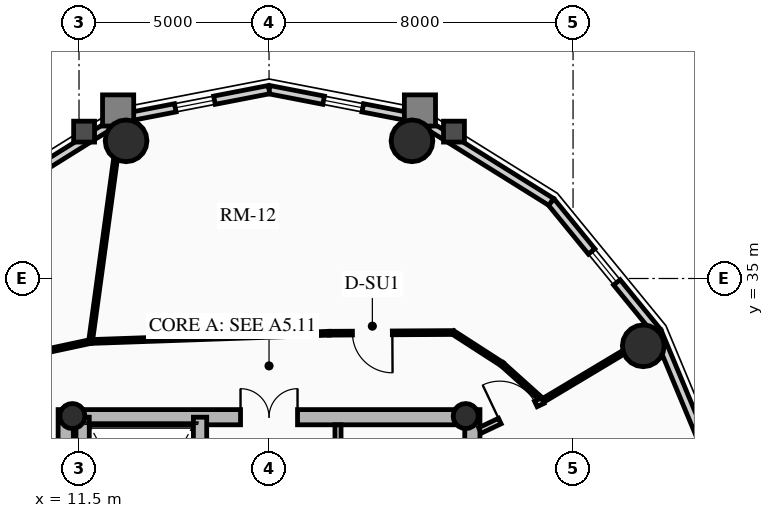
"""IFC4 building model, lengths in metres.
Left out: names, types, materials, properties, quantities, classifications, styles, units other than length and angle.
Written with IfcOpenShell. Run it as: python <this file> out.ifc"""

import sys

from ifc_helpers import new_model, si_unit, direction, frame, frame_2d, origin, origin_2d, place, context, subcontext, project, spatial, rectangle, circle, hollow_circle, extrude, source, transform, mapped, element, fill, save


model = new_model("IFC4")
c1 = context("Model", 3, precision=1e-05, world=origin(), true_north=direction((0.0, 1.0)))
c2 = subcontext(c1, "Body", "Model", "MODEL_VIEW")
j1 = project(units=[si_unit("LENGTHUNIT", "METRE"), si_unit("PLANEANGLEUNIT", "RADIAN")], contexts=[c1])
p1 = place(None, origin())
s1 = spatial("IfcSite", under=j1, at=p1, CompositionType="ELEMENT")
p2 = place(p1, origin())
s2 = spatial("IfcBuilding", under=s1, at=p2, CompositionType="ELEMENT")
p3 = place(p2, frame((0.0, 0.0, 202.48)))
s3 = spatial("IfcBuildingStorey", under=s2, at=p3, CompositionType="ELEMENT", Elevation=202.48)
for number, where, z_axis, x_axis in (
    (1, (11.15, 17.45, 0.0), (0.0, 0.0, 1.0), (0.0, 1.0, 0.0)),
    (2, (21.85, 17.45, 0.0), (0.0, 0.0, 1.0), (0.0, 1.0, 0.0)),
):
    element("IfcWall", number, at=place(p3, frame(where, z_axis=z_axis, x_axis=x_axis)), inside=s3, PredefinedType="SHEAR", context=c2, shape_type="SweptSolid", body=[
        extrude(rectangle(XDim=14.1, YDim=0.4, at=frame_2d((7.05, 0.0))), origin(), (0.0, 0.0, 1.0), 2.91),
    ])
p4 = place(p3, frame((11.15, 31.35, 0.0), z_axis=(0.0, 0.0, 1.0), x_axis=(1.0, 0.0, 0.0)))
e3 = element("IfcWall", 3, at=p4, inside=s3, PredefinedType="SHEAR", context=c2, shape_type="SweptSolid", body=[
    extrude(rectangle(XDim=10.7, YDim=0.4, at=frame_2d((5.35, 0.0))), origin(), (0.0, 0.0, 1.0), 2.91),
])
m1 = source(origin(), c2, "Body", "SweptSolid", [
    extrude(rectangle(XDim=1.5, YDim=2.02, at=frame_2d((0.75, 1.01))), frame((0.0, 0.21, 0.0), z_axis=(0.0, -1.0, 0.0), x_axis=(1.0, 0.0, 0.0)), (0.0, 0.0, 1.0), 0.42),
])
p5 = place(p4, frame((4.6, 0.0, 0.0)))
e4 = element("IfcOpeningElement", 4, at=p5, cuts=e3, PredefinedType="OPENING", context=c2, shape_type="MappedRepresentation", body=[
    mapped(m1, transform((0.0, 0.0, 0.0), x_axis=(1.0, 0.0, 0.0), y_axis=(0.0, 1.0, 0.0), z_axis=(0.0, 0.0, 1.0), scale=1.0)),
])
p6 = place(p3, frame((14.685, 17.65, 0.0), z_axis=(0.0, 0.0, 1.0), x_axis=(0.0, 1.0, 0.0)))
e5 = element("IfcWall", 5, at=p6, inside=s3, PredefinedType="SHEAR", context=c2, shape_type="SweptSolid", body=[
    extrude(rectangle(XDim=13.7, YDim=0.35, at=frame_2d((6.85, 0.0))), origin(), (0.0, 0.0, 1.0), 2.91),
])
m2 = source(origin(), c2, "Body", "SweptSolid", [
    extrude(rectangle(XDim=1.1, YDim=2.015, at=frame_2d((0.55, 1.007))), frame((0.0, 0.185, 0.0), z_axis=(0.0, -1.0, 0.0), x_axis=(1.0, 0.0, 0.0)), (0.0, 0.0, 1.0), 0.37),
])
p7 = place(p6, frame((4.85, 0.0, 0.0)))
e6 = element("IfcOpeningElement", 6, at=p7, cuts=e5, PredefinedType="OPENING", context=c2, shape_type="MappedRepresentation", body=[
    mapped(m2, transform((0.0, 0.0, 0.0), x_axis=(1.0, 0.0, 0.0), y_axis=(0.0, 1.0, 0.0), z_axis=(0.0, 0.0, 1.0), scale=1.0)),
])
p8 = place(p6, frame((0.625, 0.0, 0.0)))
e7 = element("IfcOpeningElement", 7, at=p8, cuts=e5, PredefinedType="OPENING", context=c2, shape_type="MappedRepresentation", body=[
    mapped(m2, transform((0.0, 0.0, 0.0), x_axis=(1.0, 0.0, 0.0), y_axis=(0.0, 1.0, 0.0), z_axis=(0.0, 0.0, 1.0), scale=1.0)),
])
p9 = place(p6, frame((2.625, 0.0, 0.0)))
e8 = element("IfcOpeningElement", 8, at=p9, cuts=e5, PredefinedType="OPENING", context=c2, shape_type="MappedRepresentation", body=[
    mapped(m2, transform((0.0, 0.0, 0.0), x_axis=(1.0, 0.0, 0.0), y_axis=(0.0, 1.0, 0.0), z_axis=(0.0, 0.0, 1.0), scale=1.0)),
])
m3 = source(origin(), c2, "Body", "SweptSolid", [
    extrude(rectangle(XDim=1.15, YDim=2.02, at=frame_2d((0.575, 1.01))), frame((0.0, 0.185, 0.0), z_axis=(0.0, -1.0, 0.0), x_axis=(1.0, 0.0, 0.0)), (0.0, 0.0, 1.0), 0.37),
])
p10 = place(p6, frame((7.27, 0.0, 0.0)))
e9 = element("IfcOpeningElement", 9, at=p10, cuts=e5, PredefinedType="OPENING", context=c2, shape_type="MappedRepresentation", body=[
    mapped(m3, transform((0.0, 0.0, 0.0), x_axis=(1.0, 0.0, 0.0), y_axis=(0.0, 1.0, 0.0), z_axis=(0.0, 0.0, 1.0), scale=1.0)),
])
p11 = place(p3, frame((11.595, 24.655, 0.0), z_axis=(0.0, 0.0, 1.0), x_axis=(0.0, 1.0, 0.0)))
e10 = element("IfcWall", 10, at=p11, inside=s3, PredefinedType="SHEAR", context=c2, shape_type="SweptSolid", body=[
    extrude(rectangle(XDim=6.695, YDim=0.35, at=frame_2d((3.348, 0.0))), origin(), (0.0, 0.0, 1.0), 2.91),
])
for number, where, z_axis, x_axis in (
    (11, (11.325, 31.38, 0.0), (0.0, 0.0, 1.0), (1.0, 0.0, 0.0)),
    (12, (21.675, 31.38, 0.0), (0.0, 0.0, 1.0), (1.0, 0.0, 0.0)),
):
    element("IfcColumn", number, at=place(p3, frame(where, z_axis=z_axis, x_axis=x_axis)), inside=s3, PredefinedType="COLUMN", context=c2, shape_type="SweptSolid", body=[
        extrude(hollow_circle(Radius=0.33, WallThickness=0.025, at=origin_2d()), origin(), (0.0, 0.0, 1.0), 2.91),
    ])
for number, where, z_axis, x_axis in (
    (13, (26.347, 33.229, 0.0), (0.0, 0.0, 1.0), (1.0, 0.0, 0.0)),
    (14, (20.261, 38.623, 0.0), (0.0, 0.0, 1.0), (1.0, 0.0, 0.0)),
    (15, (12.739, 38.623, 0.0), (0.0, 0.0, 1.0), (1.0, 0.0, 0.0)),
):
    element("IfcColumn", number, at=place(p3, frame(where, z_axis=z_axis, x_axis=x_axis)), inside=s3, PredefinedType="USERDEFINED", context=c2, shape_type="SweptSolid", body=[
        extrude(circle(Radius=0.55, at=origin_2d()), origin(), (0.0, 0.0, 1.0), 2.91),
    ])
p12 = place(p3, frame((26.718, 33.593, 0.0), z_axis=(0.0, 0.0, 1.0), x_axis=(0.384036305194, -0.923317993052, 0.0)))
e16 = element("IfcWall", 16, at=p12, inside=s3, PredefinedType="SOLIDWALL", context=c2, shape_type="SweptSolid", body=[
    extrude(rectangle(XDim=4.671, YDim=0.22, at=frame_2d((2.335, 0.0))), origin(), (0.0, 0.0, 1.0), 2.322),
])
p13 = place(p3, frame((23.924, 37.015, 0.0), z_axis=(0.0, 0.0, 1.0), x_axis=(0.632467166636, -0.774587169483, 0.0)))
e17 = element("IfcWall", 17, at=p13, inside=s3, PredefinedType="SOLIDWALL", context=c2, shape_type="SweptSolid", body=[
    extrude(rectangle(XDim=4.418, YDim=0.22, at=frame_2d((2.209, 0.0))), origin(), (0.0, 0.0, 1.0), 2.322),
])
m4 = source(origin(), c2, "Body", "SweptSolid", [
    extrude(rectangle(XDim=1.05, YDim=1.3, at=frame_2d((0.525, 0.65))), frame((0.0, 0.12, 0.0), z_axis=(0.0, -1.0, 0.0), x_axis=(1.0, 0.0, 0.0)), (0.0, 0.0, 1.0), 0.24),
])
p14 = place(p13, frame((1.684, 0.0, 0.65)))
e18 = element("IfcOpeningElement", 18, at=p14, cuts=e17, PredefinedType="OPENING", context=c2, shape_type="MappedRepresentation", body=[
    mapped(m4, transform((0.0, 0.0, 0.0), x_axis=(1.0, 0.0, 0.0), y_axis=(0.0, 1.0, 0.0), z_axis=(0.0, 0.0, 1.0), scale=1.0)),
])
p15 = place(p3, frame((20.403, 39.213, 0.0), z_axis=(0.0, 0.0, 1.0), x_axis=(0.848318713376, -0.529485939886, 0.0)))
e19 = element("IfcWall", 19, at=p15, inside=s3, PredefinedType="SOLIDWALL", context=c2, shape_type="SweptSolid", body=[
    extrude(rectangle(XDim=4.15, YDim=0.22, at=frame_2d((2.075, 0.0))), origin(), (0.0, 0.0, 1.0), 2.322),
])
p16 = place(p3, frame((16.5, 39.97, 0.0), z_axis=(0.0, 0.0, 1.0), x_axis=(0.981700307484, -0.190432419211, 0.0)))
e20 = element("IfcWall", 20, at=p16, inside=s3, PredefinedType="SOLIDWALL", context=c2, shape_type="SweptSolid", body=[
    extrude(rectangle(XDim=3.976, YDim=0.22, at=frame_2d((1.988, 0.0))), origin(), (0.0, 0.0, 1.0), 2.322),
])
p17 = place(p16, frame((1.463, 0.0, 0.65)))
e21 = element("IfcOpeningElement", 21, at=p17, cuts=e20, PredefinedType="OPENING", context=c2, shape_type="MappedRepresentation", body=[
    mapped(m4, transform((0.0, 0.0, 0.0), x_axis=(1.0, 0.0, 0.0), y_axis=(0.0, 1.0, 0.0), z_axis=(0.0, 0.0, 1.0), scale=1.0)),
])
p18 = place(p3, frame((12.597, 39.213, 0.0), z_axis=(0.0, 0.0, 1.0), x_axis=(0.981700307484, 0.190432419211, 0.0)))
e22 = element("IfcWall", 22, at=p18, inside=s3, PredefinedType="SOLIDWALL", context=c2, shape_type="SweptSolid", body=[
    extrude(rectangle(XDim=3.976, YDim=0.22, at=frame_2d((1.988, 0.0))), origin(), (0.0, 0.0, 1.0), 2.322),
])
p19 = place(p18, frame((1.463, 0.0, 0.65)))
e23 = element("IfcOpeningElement", 23, at=p19, cuts=e22, PredefinedType="OPENING", context=c2, shape_type="MappedRepresentation", body=[
    mapped(m4, transform((0.0, 0.0, 0.0), x_axis=(1.0, 0.0, 0.0), y_axis=(0.0, 1.0, 0.0), z_axis=(0.0, 0.0, 1.0), scale=1.0)),
])
p20 = place(p3, frame((9.076, 37.015, 0.0), z_axis=(0.0, 0.0, 1.0), x_axis=(0.848318713376, 0.529485939886, 0.0)))
e24 = element("IfcWall", 24, at=p20, inside=s3, PredefinedType="SOLIDWALL", context=c2, shape_type="SweptSolid", body=[
    extrude(rectangle(XDim=4.15, YDim=0.22, at=frame_2d((2.075, 0.0))), origin(), (0.0, 0.0, 1.0), 2.322),
])
p21 = place(p3, frame((18.315, 27.25, 0.0), z_axis=(0.0, 0.0, 1.0), x_axis=(0.0, 1.0, 0.0)))
e25 = element("IfcWall", 25, at=p21, inside=s3, PredefinedType="PARTITIONING", context=c2, shape_type="SweptSolid", body=[
    extrude(rectangle(XDim=3.9, YDim=0.16, at=frame_2d((1.95, 0.0))), origin(), (0.0, 0.0, 1.0), 2.685),
])
m5 = source(origin(), c2, "Body", "SweptSolid", [
    extrude(rectangle(XDim=0.9, YDim=2.005, at=frame_2d((0.45, 1.002))), frame((0.0, 0.09, 0.0), z_axis=(0.0, -1.0, 0.0), x_axis=(1.0, 0.0, 0.0)), (0.0, 0.0, 1.0), 0.18),
])
p22 = place(p21, frame((0.55, 0.0, 0.0)))
e26 = element("IfcOpeningElement", 26, at=p22, cuts=e25, PredefinedType="OPENING", context=c2, shape_type="MappedRepresentation", body=[
    mapped(m5, transform((0.0, 0.0, 0.0), x_axis=(1.0, 0.0, 0.0), y_axis=(0.0, 1.0, 0.0), z_axis=(0.0, 0.0, 1.0), scale=1.0)),
])
p23 = place(p21, frame((2.35, 0.0, 0.0)))
e27 = element("IfcOpeningElement", 27, at=p23, cuts=e25, PredefinedType="OPENING", context=c2, shape_type="MappedRepresentation", body=[
    mapped(m5, transform((0.0, 0.0, 0.0), x_axis=(1.0, 0.0, 0.0), y_axis=(0.0, 1.0, 0.0), z_axis=(0.0, 0.0, 1.0), scale=1.0)),
])
p24 = place(p3, frame((23.701, 31.786, 0.0), z_axis=(0.0, 0.0, 1.0), x_axis=(-0.743742806382, 0.668465883913, 0.0)))
e28 = element("IfcWall", 28, at=p24, inside=s3, PredefinedType="MOVABLE", context=c2, shape_type="SweptSolid", body=[
    extrude(rectangle(XDim=1.434, YDim=0.1, at=frame_2d((0.717, 0.0))), origin(), (0.0, 0.0, 1.0), 2.322),
])
p25 = place(p3, frame((22.635, 32.744, 0.0), z_axis=(0.0, 0.0, 1.0), x_axis=(-0.840119270642, 0.542401706391, 0.0)))
e29 = element("IfcWall", 29, at=p25, inside=s3, PredefinedType="MOVABLE", context=c2, shape_type="SweptSolid", body=[
    extrude(rectangle(XDim=1.538, YDim=0.1, at=frame_2d((0.769, 0.0))), origin(), (0.0, 0.0, 1.0), 2.255),
])
p26 = place(p3, frame((21.344, 33.578, 0.0), z_axis=(0.0, 0.0, 1.0), x_axis=(-0.999984243152, -0.005613684, 0.0)))
e30 = element("IfcWall", 30, at=p26, inside=s3, PredefinedType="MOVABLE", context=c2, shape_type="SweptSolid", body=[
    extrude(rectangle(XDim=3.262, YDim=0.1, at=frame_2d((1.631, 0.0))), origin(), (0.0, 0.0, 1.0), 2.322),
])
m6 = source(origin(), c2, "Body", "SweptSolid", [
    extrude(rectangle(XDim=1.05, YDim=2.015, at=frame_2d((0.525, 1.007))), frame((0.0, 0.06, 0.0), z_axis=(0.0, -1.0, 0.0), x_axis=(1.0, 0.0, 0.0)), (0.0, 0.0, 1.0), 0.12),
])
p27 = place(p26, frame((1.599, 0.0, 0.0)))
e31 = element("IfcOpeningElement", 31, at=p27, cuts=e30, PredefinedType="OPENING", context=c2, shape_type="MappedRepresentation", body=[
    mapped(m6, transform((0.0, 0.0, 0.0), x_axis=(1.0, 0.0, 0.0), y_axis=(0.0, 1.0, 0.0), z_axis=(0.0, 0.0, 1.0), scale=1.0)),
])
p28 = place(p3, frame((18.082, 33.56, 0.0), z_axis=(0.0, 0.0, 1.0), x_axis=(-0.999399009709, -0.034664382185, 0.0)))
e32 = element("IfcWall", 32, at=p28, inside=s3, PredefinedType="MOVABLE", context=c2, shape_type="SweptSolid", body=[
    extrude(rectangle(XDim=6.282, YDim=0.1, at=frame_2d((3.141, 0.0))), origin(), (0.0, 0.0, 1.0), 2.255),
])
p29 = place(p3, frame((11.803, 33.342, 0.0), z_axis=(0.0, 0.0, 1.0), x_axis=(-0.977750742783, -0.209770076483, 0.0)))
e33 = element("IfcWall", 33, at=p29, inside=s3, PredefinedType="MOVABLE", context=c2, shape_type="SweptSolid", body=[
    extrude(rectangle(XDim=1.868, YDim=0.1, at=frame_2d((0.934, 0.0))), origin(), (0.0, 0.0, 1.0), 2.255),
])
p30 = place(p3, frame((23.701, 31.786, 0.0), z_axis=(0.0, 0.0, 1.0), x_axis=(0.858059206709, 0.513550774298, 0.0)))
e34 = element("IfcWall", 34, at=p30, inside=s3, PredefinedType="MOVABLE", context=c2, shape_type="SweptSolid", body=[
    extrude(rectangle(XDim=3.497, YDim=0.1, at=frame_2d((1.748, 0.0))), origin(), (0.0, 0.0, 1.0), 2.322),
])
p31 = place(p3, frame((11.803, 33.342, 0.0), z_axis=(0.0, 0.0, 1.0), x_axis=(0.135452591041, 0.990783828885, 0.0)))
e35 = element("IfcWall", 35, at=p31, inside=s3, PredefinedType="MOVABLE", context=c2, shape_type="SweptSolid", body=[
    extrude(rectangle(XDim=5.906, YDim=0.1, at=frame_2d((2.953, 0.0))), origin(), (0.0, 0.0, 1.0), 2.322),
])
p32 = place(p3, frame((22.05, 31.0, 0.0), z_axis=(0.0, 0.0, 1.0), x_axis=(0.903013459407, 0.429612257891, 0.0)))
e36 = element("IfcWall", 36, at=p32, inside=s3, PredefinedType="PARTITIONING", context=c2, shape_type="SweptSolid", body=[
    extrude(rectangle(XDim=1.829, YDim=0.16, at=frame_2d((0.914, 0.0))), origin(), (0.0, 0.0, 1.0), 2.255),
])
m7 = source(origin(), c2, "Body", "SweptSolid", [
    extrude(rectangle(XDim=1.05, YDim=2.015, at=frame_2d((0.525, 1.007))), frame((0.0, 0.09, 0.0), z_axis=(0.0, -1.0, 0.0), x_axis=(1.0, 0.0, 0.0)), (0.0, 0.0, 1.0), 0.18),
])
p33 = place(p32, frame((0.579, 0.0, 0.0)))
e37 = element("IfcOpeningElement", 37, at=p33, cuts=e36, PredefinedType="OPENING", context=c2, shape_type="MappedRepresentation", body=[
    mapped(m7, transform((0.0, 0.0, 0.0), x_axis=(1.0, 0.0, 0.0), y_axis=(0.0, 1.0, 0.0), z_axis=(0.0, 0.0, 1.0), scale=1.0)),
])
m8 = source(origin(), c2, "Body", "SweptSolid", [
    extrude(rectangle(XDim=1.05, YDim=1.3, at=frame_2d((0.525, 0.65))), frame((0.0, 0.03, 0.0), z_axis=(0.0, -1.0, 0.0), x_axis=(1.0, 0.0, 0.0)), (0.0, 0.0, 1.0), 0.06),
])
p34 = place(p14, origin())
e38 = element("IfcWindow", 38, at=p34, inside=s3, PartitioningType="SINGLE_PANEL", PredefinedType="WINDOW", context=c2, shape_type="MappedRepresentation", body=[
    mapped(m8, transform((0.0, 0.0, 0.0), x_axis=(1.0, 0.0, 0.0), y_axis=(0.0, 1.0, 0.0), z_axis=(0.0, 0.0, 1.0), scale=1.0)),
])
fill(e18, e38)
p35 = place(p17, origin())
e39 = element("IfcWindow", 39, at=p35, inside=s3, PartitioningType="SINGLE_PANEL", PredefinedType="WINDOW", context=c2, shape_type="MappedRepresentation", body=[
    mapped(m8, transform((0.0, 0.0, 0.0), x_axis=(1.0, 0.0, 0.0), y_axis=(0.0, 1.0, 0.0), z_axis=(0.0, 0.0, 1.0), scale=1.0)),
])
fill(e21, e39)
p36 = place(p19, origin())
e40 = element("IfcWindow", 40, at=p36, inside=s3, PartitioningType="SINGLE_PANEL", PredefinedType="WINDOW", context=c2, shape_type="MappedRepresentation", body=[
    mapped(m8, transform((0.0, 0.0, 0.0), x_axis=(1.0, 0.0, 0.0), y_axis=(0.0, 1.0, 0.0), z_axis=(0.0, 0.0, 1.0), scale=1.0)),
])
fill(e23, e40)
m9 = source(origin(), c2, "Body", "SweptSolid", [
    extrude(rectangle(XDim=1.5, YDim=2.02, at=frame_2d((0.75, 1.01))), frame((0.0, 0.025, 0.0), z_axis=(0.0, -1.0, 0.0), x_axis=(1.0, 0.0, 0.0)), (0.0, 0.0, 1.0), 0.05),
])
p37 = place(p5, origin())
e41 = element("IfcDoor", 41, at=p37, inside=s3, OperationType="DOUBLE_DOOR_SINGLE_SWING", PredefinedType="DOOR", context=c2, shape_type="MappedRepresentation", body=[
    mapped(m9, transform((0.0, 0.0, 0.0), x_axis=(1.0, 0.0, 0.0), y_axis=(0.0, 1.0, 0.0), z_axis=(0.0, 0.0, 1.0), scale=1.0)),
])
fill(e4, e41)
m10 = source(origin(), c2, "Body", "SweptSolid", [
    extrude(rectangle(XDim=1.05, YDim=2.015, at=frame_2d((0.525, 1.007))), frame((0.0, 0.025, 0.0), z_axis=(0.0, -1.0, 0.0), x_axis=(1.0, 0.0, 0.0)), (0.0, 0.0, 1.0), 0.05),
])
p38 = place(p33, origin())
e42 = element("IfcDoor", 42, at=p38, inside=s3, OperationType="SINGLE_SWING_LEFT", PredefinedType="DOOR", context=c2, shape_type="MappedRepresentation", body=[
    mapped(m10, transform((0.0, 0.0, 0.0), x_axis=(1.0, 0.0, 0.0), y_axis=(0.0, 1.0, 0.0), z_axis=(0.0, 0.0, 1.0), scale=1.0)),
])
fill(e37, e42)
p39 = place(p27, origin())
e43 = element("IfcDoor", 43, at=p39, inside=s3, OperationType="SINGLE_SWING_LEFT", PredefinedType="DOOR", context=c2, shape_type="MappedRepresentation", body=[
    mapped(m10, transform((0.0, 0.0, 0.0), x_axis=(1.0, 0.0, 0.0), y_axis=(0.0, 1.0, 0.0), z_axis=(0.0, 0.0, 1.0), scale=1.0)),
])
fill(e31, e43)
save(model, sys.argv[1])
